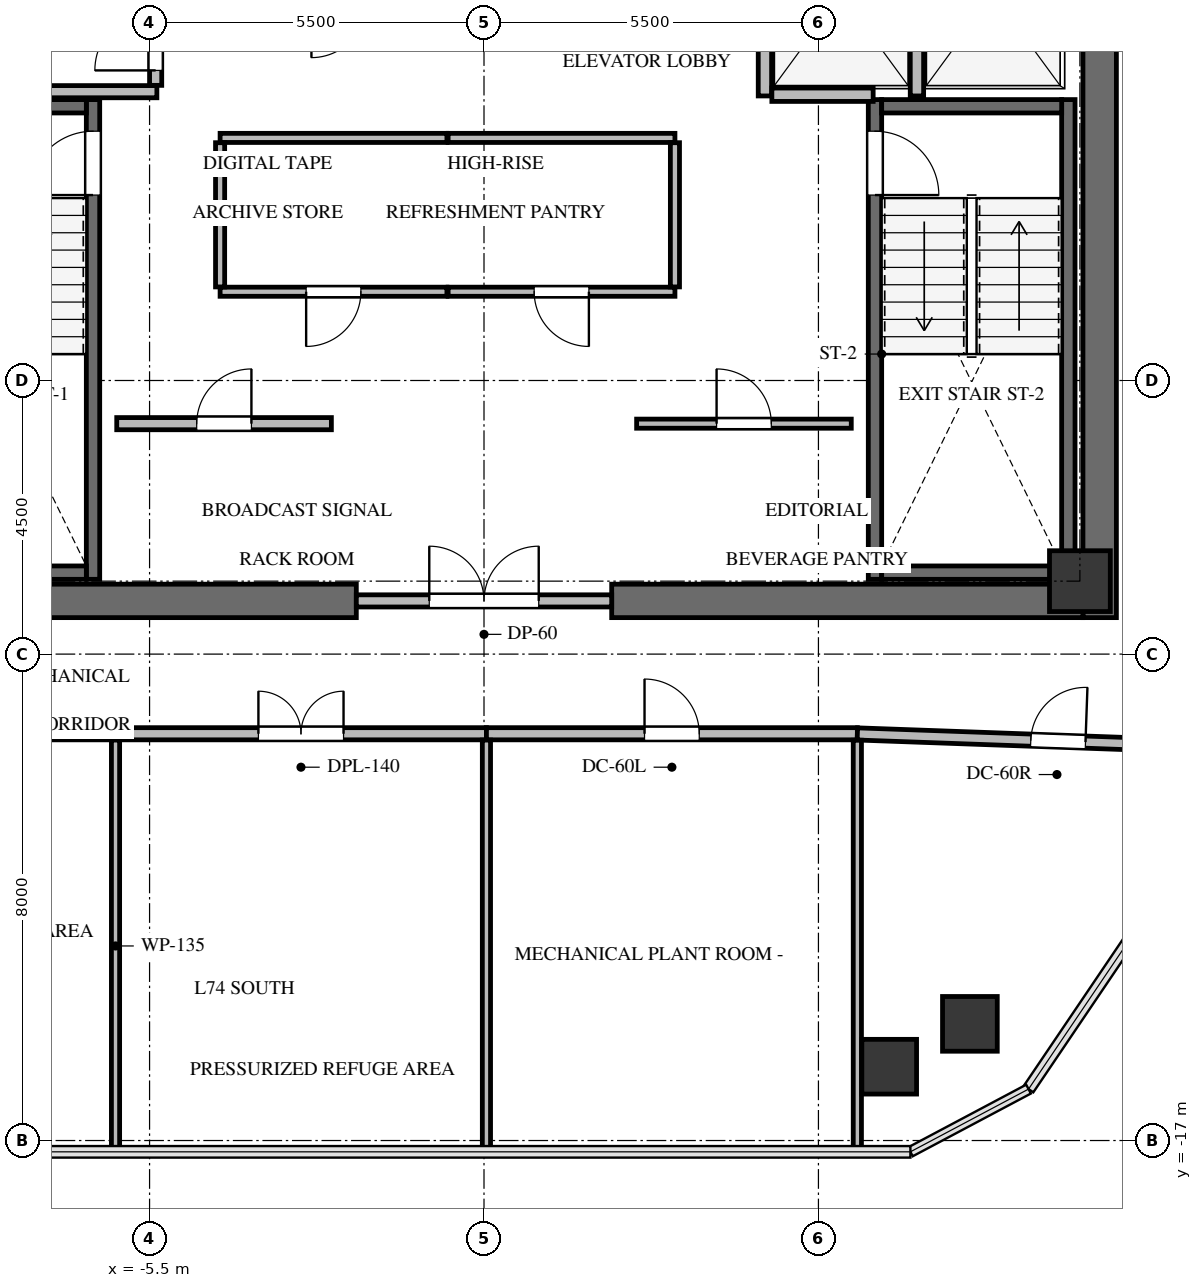
"""IFC4 building model, lengths in metres.
Left out: names, types, materials, properties, quantities, classifications, styles, units other than length and angle.
Written with IfcOpenShell. Run it as: python <this file> out.ifc"""

import sys

from ifc_helpers import new_model, si_unit, direction, frame, frame_2d, origin, origin_2d, place, context, subcontext, project, spatial, rectangle, extrude, source, transform, mapped, element, fill, save


model = new_model("IFC4")
c1 = context("Model", 3, precision=1e-05, world=origin(), true_north=direction((0.0, 1.0)))
c2 = subcontext(c1, "Body", "Model", "MODEL_VIEW")
j1 = project(units=[si_unit("LENGTHUNIT", "METRE"), si_unit("PLANEANGLEUNIT", "RADIAN")], contexts=[c1])
p1 = place(None, origin())
s1 = spatial("IfcSite", under=j1, at=p1, CompositionType="ELEMENT")
p2 = place(p1, origin())
s2 = spatial("IfcBuilding", under=s1, at=p2, CompositionType="ELEMENT")
p3 = place(p2, frame((0.0, 0.0, 264.9)))
s3 = spatial("IfcBuildingStorey", under=s2, at=p3, CompositionType="ELEMENT", Elevation=264.9)
p4 = place(p3, frame((10.125, -8.4, 0.0), z_axis=(0.0, 0.0, 1.0), x_axis=(0.0, 1.0, 0.0)))
e1 = element("IfcWall", 1, at=p4, inside=s3, PredefinedType="SHEAR", context=c2, shape_type="SweptSolid", body=[
    extrude(rectangle(XDim=16.8, YDim=0.55, at=frame_2d((8.4, 0.0))), origin(), (0.0, 0.0, 1.0), 3.4),
])
for number, where, z_axis, x_axis in (
    (2, (-9.85, -8.125, 0.0), (0.0, 0.0, 1.0), (1.0, 0.0, 0.0)),
    (3, (2.1, -8.125, 0.0), (0.0, 0.0, 1.0), (1.0, 0.0, 0.0)),
):
    element("IfcWall", number, at=place(p3, frame(where, z_axis=z_axis, x_axis=x_axis)), inside=s3, PredefinedType="SHEAR", context=c2, shape_type="SweptSolid", body=[
        extrude(rectangle(XDim=7.75, YDim=0.55, at=frame_2d((3.875, 0.0))), origin(), (0.0, 0.0, 1.0), 3.4),
    ])
p5 = place(p3, frame((-6.43, -7.77, -0.3), z_axis=(0.0, 0.0, 1.0), x_axis=(0.0, 1.0, 0.0)))
e4 = element("IfcWall", 4, at=p5, inside=s3, PredefinedType="SHEAR", context=c2, shape_type="SweptSolid", body=[
    extrude(rectangle(XDim=7.89, YDim=0.22, at=frame_2d((3.945, 0.0))), origin(), (0.0, 0.0, 1.0), 3.4),
])
p6 = place(p5, frame((6.32, 0.0, 0.0)))
e5 = element("IfcOpeningElement", 5, at=p6, cuts=e4, PredefinedType="OPENING", context=c2, shape_type="SweptSolid", body=[
    extrude(rectangle(XDim=1.05, YDim=2.15, at=frame_2d((0.525, 1.075))), frame((0.0, 0.12, 0.0), z_axis=(0.0, -1.0, 0.0), x_axis=(1.0, 0.0, 0.0)), (0.0, 0.0, 1.0), 0.24),
])
for number, where, z_axis, x_axis in (
    (6, (-9.5, -7.66, -0.3), (0.0, 0.0, 1.0), (1.0, 0.0, 0.0)),
    (7, (-6.54, 0.01, -0.3), (0.0, 0.0, 1.0), (-1.0, 0.0, 0.0)),
):
    element("IfcWall", number, at=place(p3, frame(where, z_axis=z_axis, x_axis=x_axis)), inside=s3, PredefinedType="SHEAR", context=c2, shape_type="SweptSolid", body=[
        extrude(rectangle(XDim=2.96, YDim=0.22, at=frame_2d((1.48, 0.0))), origin(), (0.0, 0.0, 1.0), 3.4),
    ])
p7 = place(p3, frame((9.61, -7.77, -0.3), z_axis=(0.0, 0.0, 1.0), x_axis=(0.0, 1.0, 0.0)))
e8 = element("IfcWall", 8, at=p7, inside=s3, PredefinedType="SHEAR", context=c2, shape_type="SweptSolid", body=[
    extrude(rectangle(XDim=7.89, YDim=0.22, at=frame_2d((3.945, 0.0))), origin(), (0.0, 0.0, 1.0), 3.4),
])
p8 = place(p3, frame((6.43, 0.12, -0.3), z_axis=(0.0, 0.0, 1.0), x_axis=(0.0, -1.0, 0.0)))
e9 = element("IfcWall", 9, at=p8, inside=s3, PredefinedType="SHEAR", context=c2, shape_type="SweptSolid", body=[
    extrude(rectangle(XDim=7.89, YDim=0.22, at=frame_2d((3.945, 0.0))), origin(), (0.0, 0.0, 1.0), 3.4),
])
p9 = place(p8, frame((0.52, 0.0, 0.0)))
e10 = element("IfcOpeningElement", 10, at=p9, cuts=e9, PredefinedType="OPENING", context=c2, shape_type="SweptSolid", body=[
    extrude(rectangle(XDim=1.05, YDim=2.15, at=frame_2d((0.525, 1.075))), frame((0.0, 0.12, 0.0), z_axis=(0.0, -1.0, 0.0), x_axis=(1.0, 0.0, 0.0)), (0.0, 0.0, 1.0), 0.24),
])
for number, where, z_axis, x_axis in (
    (11, (6.54, -7.66, -0.3), (0.0, 0.0, 1.0), (1.0, 0.0, 0.0)),
    (12, (9.5, 0.01, -0.3), (0.0, 0.0, 1.0), (-1.0, 0.0, 0.0)),
):
    element("IfcWall", number, at=place(p3, frame(where, z_axis=z_axis, x_axis=x_axis)), inside=s3, PredefinedType="SHEAR", context=c2, shape_type="SweptSolid", body=[
        extrude(rectangle(XDim=2.96, YDim=0.22, at=frame_2d((1.48, 0.0))), origin(), (0.0, 0.0, 1.0), 3.4),
    ])
m1 = source(origin(), c2, "Body", "SweptSolid", [
    extrude(rectangle(XDim=1.0, YDim=1.0, at=origin_2d()), origin(), (0.0, 0.0, 1.0), 3.4),
])
p10 = place(p3, frame((9.8, -7.8, -0.3), z_axis=(0.0, 0.0, 1.0), x_axis=(1.0, 0.0, 0.0)))
e13 = element("IfcColumn", 13, at=p10, inside=s3, PredefinedType="COLUMN", context=c2, shape_type="MappedRepresentation", body=[
    mapped(m1, transform((0.0, 0.0, 0.0), x_axis=(1.0, 0.0, 0.0), y_axis=(0.0, 1.0, 0.0), z_axis=(0.0, 0.0, 1.0), scale=1.0)),
])
m2 = source(origin(), c2, "Body", "SweptSolid", [
    extrude(rectangle(XDim=0.9, YDim=0.9, at=origin_2d()), origin(), (0.0, 0.0, 1.0), 3.4),
])
for number, where, z_axis, x_axis in (
    (14, (7.991, -15.081, -0.3), (0.0, 0.0, 1.0), (1.0, 0.0, 0.0)),
    (15, (6.664, -15.786, -0.3), (0.0, 0.0, 1.0), (1.0, 0.0, 0.0)),
):
    element("IfcColumn", number, at=place(p3, frame(where, z_axis=z_axis, x_axis=x_axis)), inside=s3, PredefinedType="COLUMN", context=c2, shape_type="MappedRepresentation", body=[
        mapped(m2, transform((0.0, 0.0, 0.0), x_axis=(1.0, 0.0, 0.0), y_axis=(0.0, 1.0, 0.0), z_axis=(0.0, 0.0, 1.0), scale=1.0)),
    ])
p11 = place(p3, frame((-2.1, -8.125, 0.0), z_axis=(0.0, 0.0, 1.0), x_axis=(1.0, 0.0, 0.0)))
e16 = element("IfcWall", 16, at=p11, inside=s3, PredefinedType="SOLIDWALL", context=c2, shape_type="SweptSolid", body=[
    extrude(rectangle(XDim=4.2, YDim=0.2, at=frame_2d((2.1, 0.0))), origin(), (0.0, 0.0, 1.0), 3.085),
])
p12 = place(p11, frame((1.2, 0.0, 0.0)))
e17 = element("IfcOpeningElement", 17, at=p12, cuts=e16, PredefinedType="OPENING", context=c2, shape_type="SweptSolid", body=[
    extrude(rectangle(XDim=1.8, YDim=2.15, at=frame_2d((0.9, 1.075))), frame((0.0, 0.11, 0.0), z_axis=(0.0, -1.0, 0.0), x_axis=(1.0, 0.0, 0.0)), (0.0, 0.0, 1.0), 0.22),
])
p13 = place(p3, frame((-9.65, 0.25, 0.0), z_axis=(0.0, 0.0, 1.0), x_axis=(1.0, 0.0, 0.0)))
e18 = element("IfcWall", 18, at=p13, inside=s3, PredefinedType="SOLIDWALL", context=c2, shape_type="SweptSolid", body=[
    extrude(rectangle(XDim=4.27, YDim=0.2, at=frame_2d((2.135, 0.0))), origin(), (0.0, 0.0, 1.0), 3.085),
])
p14 = place(p3, frame((-5.4, 0.354, 0.0), z_axis=(0.0, 0.0, 1.0), x_axis=(0.0, 1.0, 0.0)))
e19 = element("IfcWall", 19, at=p14, inside=s3, PredefinedType="SOLIDWALL", context=c2, shape_type="SweptSolid", body=[
    extrude(rectangle(XDim=4.026, YDim=0.2, at=frame_2d((2.013, 0.0))), origin(), (0.0, 0.0, 1.0), 3.085),
])
p15 = place(p14, frame((0.246, 0.0, 0.0)))
e20 = element("IfcOpeningElement", 20, at=p15, cuts=e19, PredefinedType="OPENING", context=c2, shape_type="SweptSolid", body=[
    extrude(rectangle(XDim=1.0, YDim=2.15, at=frame_2d((0.5, 1.075))), frame((0.0, 0.11, 0.0), z_axis=(0.0, -1.0, 0.0), x_axis=(1.0, 0.0, 0.0)), (0.0, 0.0, 1.0), 0.22),
])
for number, where, z_axis, x_axis in (
    (21, (4.62, 0.18, 0.0), (0.0, 0.0, 1.0), (0.0, 1.0, 0.0)),
    (22, (7.12, 0.18, 0.0), (0.0, 0.0, 1.0), (0.0, 1.0, 0.0)),
):
    element("IfcWall", number, at=place(p3, frame(where, z_axis=z_axis, x_axis=x_axis)), inside=s3, PredefinedType="SOLIDWALL", context=c2, shape_type="SweptSolid", body=[
        extrude(rectangle(XDim=3.186, YDim=0.22, at=frame_2d((1.593, 0.0))), origin(), (0.0, 0.0, 1.0), 3.085),
    ])
p16 = place(p3, frame((4.734, 0.2, 0.0), z_axis=(0.0, 0.0, 1.0), x_axis=(1.0, 0.0, 0.0)))
e23 = element("IfcWall", 23, at=p16, inside=s3, PredefinedType="SOLIDWALL", context=c2, shape_type="SweptSolid", body=[
    extrude(rectangle(XDim=1.666, YDim=0.22, at=frame_2d((0.833, 0.0))), origin(), (0.0, 0.0, 1.0), 3.085),
])
p17 = place(p3, frame((-6.04, -5.21, 0.0), z_axis=(0.0, 0.0, 1.0), x_axis=(1.0, 0.0, 0.0)))
e24 = element("IfcWall", 24, at=p17, inside=s3, PredefinedType="SOLIDWALL", context=c2, shape_type="SweptSolid", body=[
    extrude(rectangle(XDim=3.53, YDim=0.2, at=frame_2d((1.765, 0.0))), origin(), (0.0, 0.0, 1.0), 3.085),
])
p18 = place(p17, frame((1.315, 0.0, 0.0)))
e25 = element("IfcOpeningElement", 25, at=p18, cuts=e24, PredefinedType="OPENING", context=c2, shape_type="SweptSolid", body=[
    extrude(rectangle(XDim=0.9, YDim=2.05, at=frame_2d((0.45, 1.025))), frame((0.0, 0.11, 0.0), z_axis=(0.0, -1.0, 0.0), x_axis=(1.0, 0.0, 0.0)), (0.0, 0.0, 1.0), 0.22),
])
p19 = place(p3, frame((2.51, -5.21, 0.0), z_axis=(0.0, 0.0, 1.0), x_axis=(1.0, 0.0, 0.0)))
e26 = element("IfcWall", 26, at=p19, inside=s3, PredefinedType="PARTITIONING", context=c2, shape_type="SweptSolid", body=[
    extrude(rectangle(XDim=3.53, YDim=0.15, at=frame_2d((1.765, 0.0))), origin(), (0.0, 0.0, 1.0), 3.085),
])
p20 = place(p19, frame((1.315, 0.0, 0.0)))
e27 = element("IfcOpeningElement", 27, at=p20, cuts=e26, PredefinedType="OPENING", context=c2, shape_type="SweptSolid", body=[
    extrude(rectangle(XDim=0.9, YDim=2.05, at=frame_2d((0.45, 1.025))), frame((0.0, 0.085, 0.0), z_axis=(0.0, -1.0, 0.0), x_axis=(1.0, 0.0, 0.0)), (0.0, 0.0, 1.0), 0.17),
])
p21 = place(p3, frame((-0.61, -3.04, 0.0), z_axis=(0.0, 0.0, 1.0), x_axis=(-1.0, 0.0, 0.0)))
e28 = element("IfcWall", 28, at=p21, inside=s3, PredefinedType="PARTITIONING", context=c2, shape_type="SweptSolid", body=[
    extrude(rectangle(XDim=3.73, YDim=0.15, at=frame_2d((1.865, 0.0))), origin(), (0.0, 0.0, 1.0), 3.085),
])
p22 = place(p21, frame((1.415, 0.0, 0.0)))
e29 = element("IfcOpeningElement", 29, at=p22, cuts=e28, PredefinedType="OPENING", context=c2, shape_type="SweptSolid", body=[
    extrude(rectangle(XDim=0.9, YDim=2.05, at=frame_2d((0.45, 1.025))), frame((0.0, 0.085, 0.0), z_axis=(0.0, -1.0, 0.0), x_axis=(1.0, 0.0, 0.0)), (0.0, 0.0, 1.0), 0.17),
])
p23 = place(p3, frame((-4.34, -0.51, 0.0), z_axis=(0.0, 0.0, 1.0), x_axis=(1.0, 0.0, 0.0)))
e30 = element("IfcWall", 30, at=p23, inside=s3, PredefinedType="PARTITIONING", context=c2, shape_type="SweptSolid", body=[
    extrude(rectangle(XDim=3.73, YDim=0.15, at=frame_2d((1.865, 0.0))), origin(), (0.0, 0.0, 1.0), 3.085),
])
p24 = place(p3, frame((-4.34, -2.961, 0.0), z_axis=(0.0, 0.0, 1.0), x_axis=(0.0, 1.0, 0.0)))
e31 = element("IfcWall", 31, at=p24, inside=s3, PredefinedType="PARTITIONING", context=c2, shape_type="SweptSolid", body=[
    extrude(rectangle(XDim=2.372, YDim=0.15, at=frame_2d((1.186, 0.0))), origin(), (0.0, 0.0, 1.0), 3.085),
])
p25 = place(p3, frame((3.14, -3.04, 0.0), z_axis=(0.0, 0.0, 1.0), x_axis=(-1.0, 0.0, 0.0)))
e32 = element("IfcWall", 32, at=p25, inside=s3, PredefinedType="PARTITIONING", context=c2, shape_type="SweptSolid", body=[
    extrude(rectangle(XDim=3.73, YDim=0.15, at=frame_2d((1.865, 0.0))), origin(), (0.0, 0.0, 1.0), 3.085),
])
p26 = place(p25, frame((1.415, 0.0, 0.0)))
e33 = element("IfcOpeningElement", 33, at=p26, cuts=e32, PredefinedType="OPENING", context=c2, shape_type="SweptSolid", body=[
    extrude(rectangle(XDim=0.9, YDim=2.05, at=frame_2d((0.45, 1.025))), frame((0.0, 0.085, 0.0), z_axis=(0.0, -1.0, 0.0), x_axis=(1.0, 0.0, 0.0)), (0.0, 0.0, 1.0), 0.17),
])
p27 = place(p3, frame((-0.59, -0.51, 0.0), z_axis=(0.0, 0.0, 1.0), x_axis=(1.0, 0.0, 0.0)))
e34 = element("IfcWall", 34, at=p27, inside=s3, PredefinedType="PARTITIONING", context=c2, shape_type="SweptSolid", body=[
    extrude(rectangle(XDim=3.73, YDim=0.15, at=frame_2d((1.865, 0.0))), origin(), (0.0, 0.0, 1.0), 3.085),
])
p28 = place(p3, frame((3.14, -0.589, 0.0), z_axis=(0.0, 0.0, 1.0), x_axis=(0.0, -1.0, 0.0)))
e35 = element("IfcWall", 35, at=p28, inside=s3, PredefinedType="PARTITIONING", context=c2, shape_type="SweptSolid", body=[
    extrude(rectangle(XDim=2.372, YDim=0.15, at=frame_2d((1.186, 0.0))), origin(), (0.0, 0.0, 1.0), 3.085),
])
p29 = place(p3, frame((-12.39, -10.31, 0.0), z_axis=(0.0, 0.0, 1.0), x_axis=(1.0, 0.0, 0.0)))
e36 = element("IfcWall", 36, at=p29, inside=s3, PredefinedType="SOLIDWALL", context=c2, shape_type="SweptSolid", body=[
    extrude(rectangle(XDim=6.33, YDim=0.2, at=frame_2d((3.165, 0.0))), origin(), (0.0, 0.0, 1.0), 3.085),
])
p30 = place(p29, frame((0.35, 0.0, 0.0)))
e37 = element("IfcOpeningElement", 37, at=p30, cuts=e36, PredefinedType="OPENING", context=c2, shape_type="SweptSolid", body=[
    extrude(rectangle(XDim=1.4, YDim=2.15, at=frame_2d((0.7, 1.075))), frame((0.0, 0.11, 0.0), z_axis=(0.0, -1.0, 0.0), x_axis=(1.0, 0.0, 0.0)), (0.0, 0.0, 1.0), 0.22),
])
p31 = place(p3, frame((-6.06, -10.31, 0.0), z_axis=(0.0, 0.0, 1.0), x_axis=(1.0, 0.0, 0.0)))
e38 = element("IfcWall", 38, at=p31, inside=s3, PredefinedType="SOLIDWALL", context=c2, shape_type="SweptSolid", body=[
    extrude(rectangle(XDim=6.1, YDim=0.2, at=frame_2d((3.05, 0.0))), origin(), (0.0, 0.0, 1.0), 2.342),
])
p32 = place(p31, frame((2.35, 0.0, 0.0)))
e39 = element("IfcOpeningElement", 39, at=p32, cuts=e38, PredefinedType="OPENING", context=c2, shape_type="SweptSolid", body=[
    extrude(rectangle(XDim=1.4, YDim=2.15, at=frame_2d((0.7, 1.075))), frame((0.0, 0.11, 0.0), z_axis=(0.0, -1.0, 0.0), x_axis=(1.0, 0.0, 0.0)), (0.0, 0.0, 1.0), 0.22),
])
p33 = place(p3, frame((0.04, -10.31, 0.0), z_axis=(0.0, 0.0, 1.0), x_axis=(1.0, 0.0, 0.0)))
e40 = element("IfcWall", 40, at=p33, inside=s3, PredefinedType="SOLIDWALL", context=c2, shape_type="SweptSolid", body=[
    extrude(rectangle(XDim=6.1, YDim=0.2, at=frame_2d((3.05, 0.0))), origin(), (0.0, 0.0, 1.0), 2.342),
])
p34 = place(p33, frame((2.6, 0.0, 0.0)))
e41 = element("IfcOpeningElement", 41, at=p34, cuts=e40, PredefinedType="OPENING", context=c2, shape_type="SweptSolid", body=[
    extrude(rectangle(XDim=0.9, YDim=2.05, at=frame_2d((0.45, 1.025))), frame((0.0, 0.11, 0.0), z_axis=(0.0, -1.0, 0.0), x_axis=(1.0, 0.0, 0.0)), (0.0, 0.0, 1.0), 0.22),
])
p35 = place(p3, frame((6.14, -10.313, 0.0), z_axis=(0.0, 0.0, 1.0), x_axis=(0.999359083983, -0.035796944861, 0.0)))
e42 = element("IfcWall", 42, at=p35, inside=s3, PredefinedType="SOLIDWALL", context=c2, shape_type="SweptSolid", body=[
    extrude(rectangle(XDim=6.609, YDim=0.2, at=frame_2d((3.304, 0.0))), origin(), (0.0, 0.0, 1.0), 2.439),
])
p36 = place(p35, frame((2.854, 0.0, 0.0)))
e43 = element("IfcOpeningElement", 43, at=p36, cuts=e42, PredefinedType="OPENING", context=c2, shape_type="SweptSolid", body=[
    extrude(rectangle(XDim=0.9, YDim=2.05, at=frame_2d((0.45, 1.025))), frame((0.0, 0.11, 0.0), z_axis=(0.0, -1.0, 0.0), x_axis=(1.0, 0.0, 0.0)), (0.0, 0.0, 1.0), 0.22),
])
p37 = place(p3, frame((-6.06, -10.414, 0.0), z_axis=(0.0, 0.0, 1.0), x_axis=(0.0, -1.0, 0.0)))
e44 = element("IfcWall", 44, at=p37, inside=s3, PredefinedType="PARTITIONING", context=c2, shape_type="SweptSolid", body=[
    extrude(rectangle(XDim=6.772, YDim=0.135, at=frame_2d((3.386, 0.0))), origin(), (0.0, 0.0, 1.0), 2.342),
])
p38 = place(p3, frame((0.04, -10.414, 0.0), z_axis=(0.0, 0.0, 1.0), x_axis=(0.0, -1.0, 0.0)))
e45 = element("IfcWall", 45, at=p38, inside=s3, PredefinedType="PARTITIONING", context=c2, shape_type="SweptSolid", body=[
    extrude(rectangle(XDim=6.772, YDim=0.135, at=frame_2d((3.386, 0.0))), origin(), (0.0, 0.0, 1.0), 2.439),
])
p39 = place(p3, frame((6.14, -10.417, 0.0), z_axis=(0.0, 0.0, 1.0), x_axis=(0.0, -1.0, 0.0)))
e46 = element("IfcWall", 46, at=p39, inside=s3, PredefinedType="PARTITIONING", context=c2, shape_type="SweptSolid", body=[
    extrude(rectangle(XDim=6.769, YDim=0.135, at=frame_2d((3.385, 0.0))), origin(), (0.0, 0.0, 1.0), 2.342),
])
m3 = source(origin(), c2, "Body", "SweptSolid", [
    extrude(rectangle(XDim=1.05, YDim=2.15, at=frame_2d((0.525, 1.075))), frame((0.0, 0.025, 0.0), z_axis=(0.0, -1.0, 0.0), x_axis=(1.0, 0.0, 0.0)), (0.0, 0.0, 1.0), 0.05),
])
p40 = place(p6, origin())
e47 = element("IfcDoor", 47, at=p40, inside=s3, OperationType="SINGLE_SWING_LEFT", PredefinedType="DOOR", context=c2, shape_type="MappedRepresentation", body=[
    mapped(m3, transform((0.0, 0.0, 0.0), x_axis=(1.0, 0.0, 0.0), y_axis=(0.0, 1.0, 0.0), z_axis=(0.0, 0.0, 1.0), scale=1.0)),
])
fill(e5, e47)
m4 = source(origin(), c2, "Body", "SweptSolid", [
    extrude(rectangle(XDim=1.05, YDim=2.15, at=frame_2d((0.525, 1.075))), frame((0.0, 0.025, 0.0), z_axis=(0.0, -1.0, 0.0), x_axis=(1.0, 0.0, 0.0)), (0.0, 0.0, 1.0), 0.05),
])
p41 = place(p9, origin())
e48 = element("IfcDoor", 48, at=p41, inside=s3, OperationType="SINGLE_SWING_RIGHT", PredefinedType="DOOR", context=c2, shape_type="MappedRepresentation", body=[
    mapped(m4, transform((0.0, 0.0, 0.0), x_axis=(1.0, 0.0, 0.0), y_axis=(0.0, 1.0, 0.0), z_axis=(0.0, 0.0, 1.0), scale=1.0)),
])
fill(e10, e48)
m5 = source(origin(), c2, "Body", "SweptSolid", [
    extrude(rectangle(XDim=1.8, YDim=2.15, at=frame_2d((0.9, 1.075))), frame((0.0, 0.025, 0.0), z_axis=(0.0, -1.0, 0.0), x_axis=(1.0, 0.0, 0.0)), (0.0, 0.0, 1.0), 0.05),
])
p42 = place(p12, origin())
e49 = element("IfcDoor", 49, at=p42, inside=s3, OperationType="DOUBLE_DOOR_SINGLE_SWING", PredefinedType="DOOR", context=c2, shape_type="MappedRepresentation", body=[
    mapped(m5, transform((0.0, 0.0, 0.0), x_axis=(1.0, 0.0, 0.0), y_axis=(0.0, 1.0, 0.0), z_axis=(0.0, 0.0, 1.0), scale=1.0)),
])
fill(e17, e49)
m6 = source(origin(), c2, "Body", "SweptSolid", [
    extrude(rectangle(XDim=1.0, YDim=2.15, at=frame_2d((0.5, 1.075))), frame((0.0, 0.025, 0.0), z_axis=(0.0, -1.0, 0.0), x_axis=(1.0, 0.0, 0.0)), (0.0, 0.0, 1.0), 0.05),
])
p43 = place(p15, origin())
e50 = element("IfcDoor", 50, at=p43, inside=s3, OperationType="SINGLE_SWING_LEFT", PredefinedType="DOOR", context=c2, shape_type="MappedRepresentation", body=[
    mapped(m6, transform((0.0, 0.0, 0.0), x_axis=(1.0, 0.0, 0.0), y_axis=(0.0, 1.0, 0.0), z_axis=(0.0, 0.0, 1.0), scale=1.0)),
])
fill(e20, e50)
m7 = source(origin(), c2, "Body", "SweptSolid", [
    extrude(rectangle(XDim=0.9, YDim=2.05, at=frame_2d((0.45, 1.025))), frame((0.0, 0.025, 0.0), z_axis=(0.0, -1.0, 0.0), x_axis=(1.0, 0.0, 0.0)), (0.0, 0.0, 1.0), 0.05),
])
p44 = place(p18, origin())
e51 = element("IfcDoor", 51, at=p44, inside=s3, OperationType="SINGLE_SWING_RIGHT", PredefinedType="DOOR", context=c2, shape_type="MappedRepresentation", body=[
    mapped(m7, transform((0.0, 0.0, 0.0), x_axis=(1.0, 0.0, 0.0), y_axis=(0.0, 1.0, 0.0), z_axis=(0.0, 0.0, 1.0), scale=1.0)),
])
fill(e25, e51)
m8 = source(origin(), c2, "Body", "SweptSolid", [
    extrude(rectangle(XDim=0.9, YDim=2.05, at=frame_2d((0.45, 1.025))), frame((0.0, 0.025, 0.0), z_axis=(0.0, -1.0, 0.0), x_axis=(1.0, 0.0, 0.0)), (0.0, 0.0, 1.0), 0.05),
])
p45 = place(p20, origin())
e52 = element("IfcDoor", 52, at=p45, inside=s3, OperationType="SINGLE_SWING_LEFT", PredefinedType="DOOR", context=c2, shape_type="MappedRepresentation", body=[
    mapped(m8, transform((0.0, 0.0, 0.0), x_axis=(1.0, 0.0, 0.0), y_axis=(0.0, 1.0, 0.0), z_axis=(0.0, 0.0, 1.0), scale=1.0)),
])
fill(e27, e52)
p46 = place(p22, origin())
e53 = element("IfcDoor", 53, at=p46, inside=s3, OperationType="SINGLE_SWING_RIGHT", PredefinedType="DOOR", context=c2, shape_type="MappedRepresentation", body=[
    mapped(m7, transform((0.0, 0.0, 0.0), x_axis=(1.0, 0.0, 0.0), y_axis=(0.0, 1.0, 0.0), z_axis=(0.0, 0.0, 1.0), scale=1.0)),
])
fill(e29, e53)
p47 = place(p26, origin())
e54 = element("IfcDoor", 54, at=p47, inside=s3, OperationType="SINGLE_SWING_LEFT", PredefinedType="DOOR", context=c2, shape_type="MappedRepresentation", body=[
    mapped(m8, transform((0.0, 0.0, 0.0), x_axis=(1.0, 0.0, 0.0), y_axis=(0.0, 1.0, 0.0), z_axis=(0.0, 0.0, 1.0), scale=1.0)),
])
fill(e33, e54)
m9 = source(origin(), c2, "Body", "SweptSolid", [
    extrude(rectangle(XDim=1.4, YDim=2.15, at=frame_2d((0.7, 1.075))), frame((0.0, 0.025, 0.0), z_axis=(0.0, -1.0, 0.0), x_axis=(1.0, 0.0, 0.0)), (0.0, 0.0, 1.0), 0.05),
])
p48 = place(p32, origin())
e55 = element("IfcDoor", 55, at=p48, inside=s3, OperationType="DOUBLE_DOOR_SINGLE_SWING", PredefinedType="DOOR", context=c2, shape_type="MappedRepresentation", body=[
    mapped(m9, transform((0.0, 0.0, 0.0), x_axis=(1.0, 0.0, 0.0), y_axis=(0.0, 1.0, 0.0), z_axis=(0.0, 0.0, 1.0), scale=1.0)),
])
fill(e39, e55)
p49 = place(p34, origin())
e56 = element("IfcDoor", 56, at=p49, inside=s3, OperationType="SINGLE_SWING_LEFT", PredefinedType="DOOR", context=c2, shape_type="MappedRepresentation", body=[
    mapped(m8, transform((0.0, 0.0, 0.0), x_axis=(1.0, 0.0, 0.0), y_axis=(0.0, 1.0, 0.0), z_axis=(0.0, 0.0, 1.0), scale=1.0)),
])
fill(e41, e56)
p50 = place(p36, origin())
e57 = element("IfcDoor", 57, at=p50, inside=s3, OperationType="SINGLE_SWING_RIGHT", PredefinedType="DOOR", context=c2, shape_type="MappedRepresentation", body=[
    mapped(m7, transform((0.0, 0.0, 0.0), x_axis=(1.0, 0.0, 0.0), y_axis=(0.0, 1.0, 0.0), z_axis=(0.0, 0.0, 1.0), scale=1.0)),
])
fill(e43, e57)
save(model, sys.argv[1])
